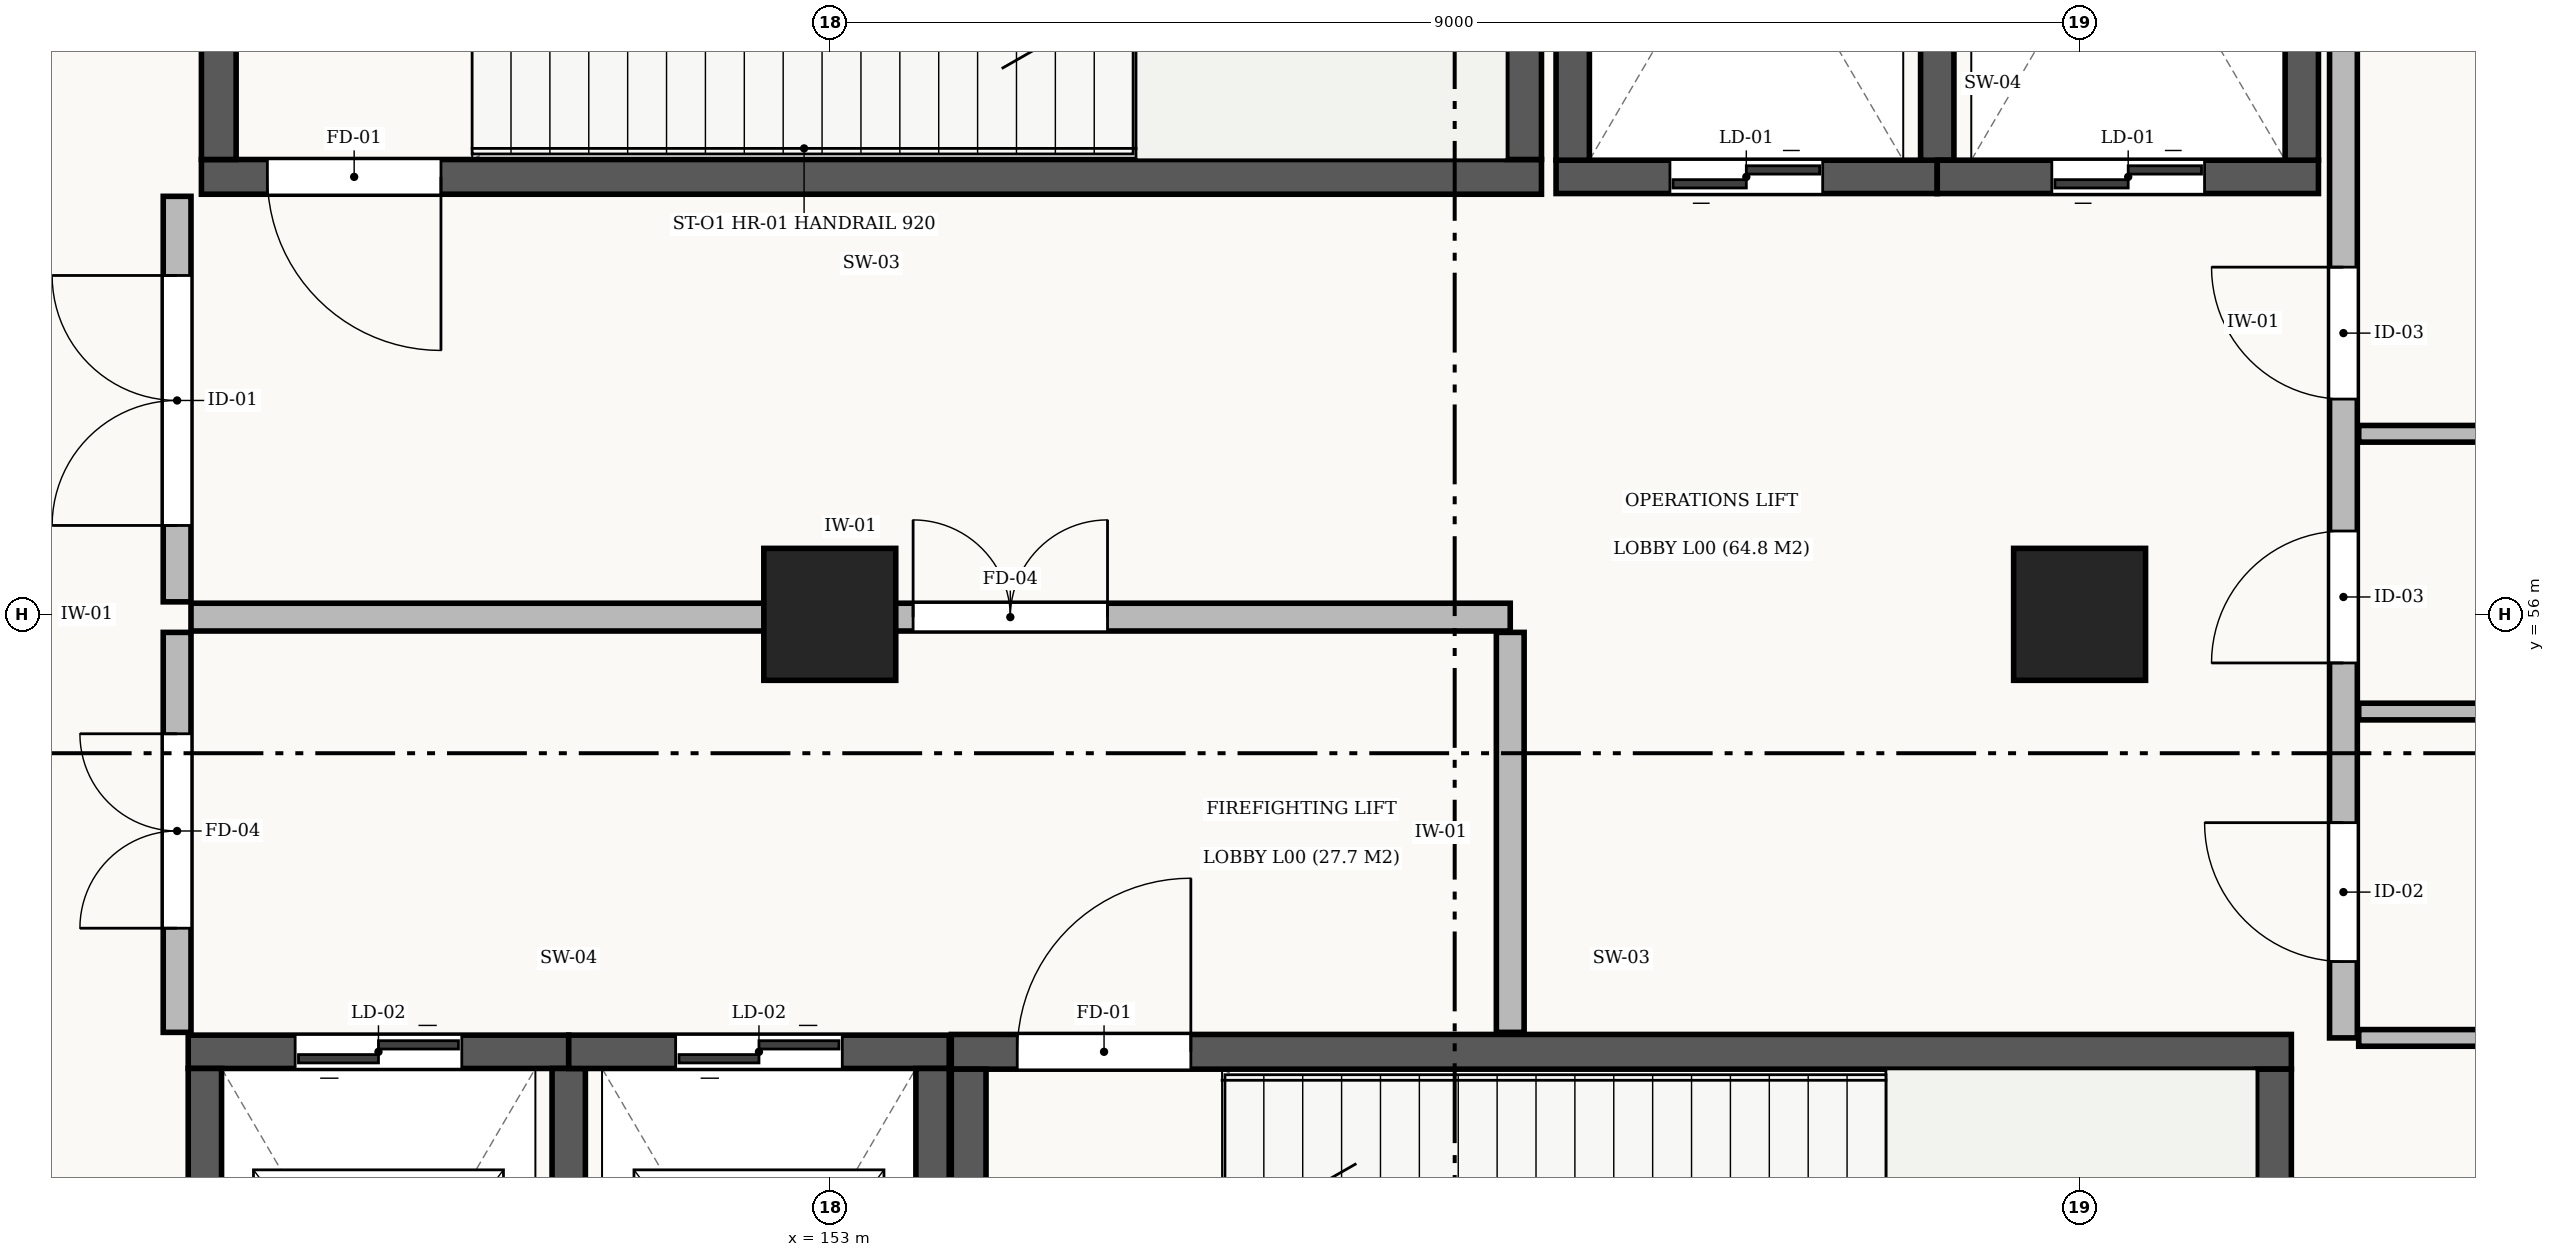
"""IFC4 building model, lengths in metres.
Left out: names, types, materials, properties, quantities, classifications, styles, units other than length and angle.
Written with IfcOpenShell. Run it as: python <this file> out.ifc"""

import sys

from ifc_helpers import new_model, si_unit, direction, frame, frame_2d, origin, origin_2d, place, context, subcontext, project, spatial, rectangle, extrude, element, fill, save


model = new_model("IFC4")
c1 = context("Model", 3, precision=1e-05, world=origin(), true_north=direction((0.0, 1.0)))
c2 = subcontext(c1, "Body", "Model", "MODEL_VIEW")
j1 = project(units=[si_unit("LENGTHUNIT", "METRE"), si_unit("PLANEANGLEUNIT", "RADIAN")], contexts=[c1])
p1 = place(None, origin())
s1 = spatial("IfcSite", under=j1, at=p1, CompositionType="ELEMENT")
p2 = place(p1, origin())
s2 = spatial("IfcBuilding", under=s1, at=p2, CompositionType="ELEMENT")
p3 = place(p2, origin())
s3 = spatial("IfcBuildingStorey", under=s2, at=p3, CompositionType="ELEMENT", Elevation=0.0)
for number, where, z_axis, x_axis in (
    (1, (153.0, 56.0, 0.0), (0.0, 0.0, 1.0), (1.0, 0.0, 0.0)),
    (2, (162.0, 56.0, 0.0), (0.0, 0.0, 1.0), (1.0, 0.0, 0.0)),
):
    element("IfcColumn", number, at=place(p3, frame(where, z_axis=z_axis, x_axis=x_axis)), inside=s3, PredefinedType="COLUMN", context=c2, shape_type="SweptSolid", body=[
        extrude(rectangle(XDim=0.95, YDim=0.95, at=origin_2d()), origin(), (0.0, 0.0, 1.0), 5.4),
    ])
p4 = place(p3, frame((148.475, 59.15, 0.0), z_axis=(0.0, 0.0, 1.0), x_axis=(1.0, 0.0, 0.0)))
e3 = element("IfcWall", 3, at=p4, inside=s3, PredefinedType="SHEAR", context=c2, shape_type="SweptSolid", body=[
    extrude(rectangle(XDim=9.65, YDim=0.25, at=frame_2d((4.825, 0.0))), origin(), (0.0, 0.0, 1.0), 5.05),
])
p5 = place(p4, frame((0.475, 0.0, 0.0)))
e4 = element("IfcOpeningElement", 4, at=p5, cuts=e3, PredefinedType="OPENING", context=c2, shape_type="SweptSolid", body=[
    extrude(rectangle(XDim=1.25, YDim=2.15, at=frame_2d((0.625, 1.075))), frame((0.0, 0.137, 0.0), z_axis=(0.0, -1.0, 0.0), x_axis=(1.0, 0.0, 0.0)), (0.0, 0.0, 1.0), 0.274),
])
for number, where, z_axis, x_axis in (
    (5, (148.6, 63.125, 0.0), (0.0, 0.0, 1.0), (0.0, -1.0, 0.0)),
    (6, (158.0, 59.275, 0.0), (0.0, 0.0, 1.0), (0.0, 1.0, 0.0)),
):
    element("IfcWall", number, at=place(p3, frame(where, z_axis=z_axis, x_axis=x_axis)), inside=s3, PredefinedType="SHEAR", context=c2, shape_type="SweptSolid", body=[
        extrude(rectangle(XDim=3.85, YDim=0.25, at=frame_2d((1.925, 0.0))), origin(), (0.0, 0.0, 1.0), 5.05),
    ])
p6 = place(p3, frame((163.525, 52.85, 0.0), z_axis=(0.0, 0.0, 1.0), x_axis=(-1.0, 0.0, 0.0)))
e7 = element("IfcWall", 7, at=p6, inside=s3, PredefinedType="SHEAR", context=c2, shape_type="SweptSolid", body=[
    extrude(rectangle(XDim=9.65, YDim=0.25, at=frame_2d((4.825, 0.0))), origin(), (0.0, 0.0, 1.0), 5.05),
])
p7 = place(p6, frame((7.925, 0.0, 0.0)))
e8 = element("IfcOpeningElement", 8, at=p7, cuts=e7, PredefinedType="OPENING", context=c2, shape_type="SweptSolid", body=[
    extrude(rectangle(XDim=1.25, YDim=2.15, at=frame_2d((0.625, 1.075))), frame((0.0, 0.137, 0.0), z_axis=(0.0, -1.0, 0.0), x_axis=(1.0, 0.0, 0.0)), (0.0, 0.0, 1.0), 0.274),
])
for number, where, z_axis, x_axis in (
    (9, (154.0, 52.725, 0.0), (0.0, 0.0, 1.0), (0.0, -1.0, 0.0)),
    (10, (163.4, 48.875, 0.0), (0.0, 0.0, 1.0), (0.0, 1.0, 0.0)),
):
    element("IfcWall", number, at=place(p3, frame(where, z_axis=z_axis, x_axis=x_axis)), inside=s3, PredefinedType="SHEAR", context=c2, shape_type="SweptSolid", body=[
        extrude(rectangle(XDim=3.85, YDim=0.25, at=frame_2d((1.925, 0.0))), origin(), (0.0, 0.0, 1.0), 5.05),
    ])
p8 = place(p3, frame((158.23, 59.15, 0.0), z_axis=(0.0, 0.0, 1.0), x_axis=(1.0, 0.0, 0.0)))
e11 = element("IfcWall", 11, at=p8, inside=s3, PredefinedType="SHEAR", context=c2, shape_type="SweptSolid", body=[
    extrude(rectangle(XDim=2.745, YDim=0.24, at=frame_2d((1.373, 0.0))), origin(), (0.0, 0.0, 1.0), 5.05),
])
p9 = place(p8, frame((0.82, 0.0, 0.0)))
e12 = element("IfcOpeningElement", 12, at=p9, cuts=e11, PredefinedType="OPENING", context=c2, shape_type="SweptSolid", body=[
    extrude(rectangle(XDim=1.1, YDim=2.2, at=frame_2d((0.55, 1.1))), frame((0.0, 0.132, 0.0), z_axis=(0.0, -1.0, 0.0), x_axis=(1.0, 0.0, 0.0)), (0.0, 0.0, 1.0), 0.264),
])
for number, where, z_axis, x_axis in (
    (13, (158.35, 63.13, 0.0), (0.0, 0.0, 1.0), (0.0, -1.0, 0.0)),
    (14, (160.975, 59.27, 0.0), (0.0, 0.0, 1.0), (0.0, 1.0, 0.0)),
):
    element("IfcWall", number, at=place(p3, frame(where, z_axis=z_axis, x_axis=x_axis)), inside=s3, PredefinedType="SHEAR", context=c2, shape_type="SweptSolid", body=[
        extrude(rectangle(XDim=3.86, YDim=0.24, at=frame_2d((1.93, 0.0))), origin(), (0.0, 0.0, 1.0), 5.05),
    ])
p10 = place(p3, frame((160.975, 59.15, 0.0), z_axis=(0.0, 0.0, 1.0), x_axis=(1.0, 0.0, 0.0)))
e15 = element("IfcWall", 15, at=p10, inside=s3, PredefinedType="SHEAR", context=c2, shape_type="SweptSolid", body=[
    extrude(rectangle(XDim=2.745, YDim=0.24, at=frame_2d((1.373, 0.0))), origin(), (0.0, 0.0, 1.0), 5.05),
])
p11 = place(p10, frame((0.825, 0.0, 0.0)))
e16 = element("IfcOpeningElement", 16, at=p11, cuts=e15, PredefinedType="OPENING", context=c2, shape_type="SweptSolid", body=[
    extrude(rectangle(XDim=1.1, YDim=2.2, at=frame_2d((0.55, 1.1))), frame((0.0, 0.132, 0.0), z_axis=(0.0, -1.0, 0.0), x_axis=(1.0, 0.0, 0.0)), (0.0, 0.0, 1.0), 0.264),
])
p12 = place(p3, frame((163.6, 59.27, 0.0), z_axis=(0.0, 0.0, 1.0), x_axis=(0.0, 1.0, 0.0)))
e17 = element("IfcWall", 17, at=p12, inside=s3, PredefinedType="SHEAR", context=c2, shape_type="SweptSolid", body=[
    extrude(rectangle(XDim=3.86, YDim=0.24, at=frame_2d((1.93, 0.0))), origin(), (0.0, 0.0, 1.0), 5.05),
])
p13 = place(p3, frame((151.12, 52.85, 0.0), z_axis=(0.0, 0.0, 1.0), x_axis=(-1.0, 0.0, 0.0)))
e18 = element("IfcWall", 18, at=p13, inside=s3, PredefinedType="SHEAR", context=c2, shape_type="SweptSolid", body=[
    extrude(rectangle(XDim=2.74, YDim=0.24, at=frame_2d((1.37, 0.0))), origin(), (0.0, 0.0, 1.0), 5.05),
])
p14 = place(p13, frame((0.77, 0.0, 0.0)))
e19 = element("IfcOpeningElement", 19, at=p14, cuts=e18, PredefinedType="OPENING", context=c2, shape_type="SweptSolid", body=[
    extrude(rectangle(XDim=1.2, YDim=2.2, at=frame_2d((0.6, 1.1))), frame((0.0, 0.132, 0.0), z_axis=(0.0, -1.0, 0.0), x_axis=(1.0, 0.0, 0.0)), (0.0, 0.0, 1.0), 0.264),
])
for number, where, z_axis, x_axis in (
    (20, (148.5, 52.73, 0.0), (0.0, 0.0, 1.0), (0.0, -1.0, 0.0)),
    (21, (151.12, 48.87, 0.0), (0.0, 0.0, 1.0), (0.0, 1.0, 0.0)),
):
    element("IfcWall", number, at=place(p3, frame(where, z_axis=z_axis, x_axis=x_axis)), inside=s3, PredefinedType="SHEAR", context=c2, shape_type="SweptSolid", body=[
        extrude(rectangle(XDim=3.86, YDim=0.24, at=frame_2d((1.93, 0.0))), origin(), (0.0, 0.0, 1.0), 5.05),
    ])
p15 = place(p3, frame((153.86, 52.85, 0.0), z_axis=(0.0, 0.0, 1.0), x_axis=(-1.0, 0.0, 0.0)))
e22 = element("IfcWall", 22, at=p15, inside=s3, PredefinedType="SHEAR", context=c2, shape_type="SweptSolid", body=[
    extrude(rectangle(XDim=2.74, YDim=0.24, at=frame_2d((1.37, 0.0))), origin(), (0.0, 0.0, 1.0), 5.05),
])
p16 = place(p15, frame((0.77, 0.0, 0.0)))
e23 = element("IfcOpeningElement", 23, at=p16, cuts=e22, PredefinedType="OPENING", context=c2, shape_type="SweptSolid", body=[
    extrude(rectangle(XDim=1.2, YDim=2.2, at=frame_2d((0.6, 1.1))), frame((0.0, 0.132, 0.0), z_axis=(0.0, -1.0, 0.0), x_axis=(1.0, 0.0, 0.0)), (0.0, 0.0, 1.0), 0.264),
])
p17 = place(p3, frame((153.74, 48.87, 0.0), z_axis=(0.0, 0.0, 1.0), x_axis=(0.0, 1.0, 0.0)))
e24 = element("IfcWall", 24, at=p17, inside=s3, PredefinedType="SHEAR", context=c2, shape_type="SweptSolid", body=[
    extrude(rectangle(XDim=3.86, YDim=0.24, at=frame_2d((1.93, 0.0))), origin(), (0.0, 0.0, 1.0), 5.05),
])
p18 = place(p3, frame((148.4, 55.98, 0.0), z_axis=(0.0, 0.0, 1.0), x_axis=(1.0, 0.0, 0.0)))
e25 = element("IfcWall", 25, at=p18, inside=s3, PredefinedType="STANDARD", context=c2, shape_type="SweptSolid", body=[
    extrude(rectangle(XDim=9.5, YDim=0.2, at=frame_2d((4.75, 0.0))), origin(), (0.0, 0.0, 1.0), 4.23),
])
p19 = place(p18, frame((5.2, 0.0, 0.0)))
e26 = element("IfcOpeningElement", 26, at=p19, cuts=e25, PredefinedType="OPENING", context=c2, shape_type="SweptSolid", body=[
    extrude(rectangle(XDim=1.4, YDim=2.2, at=frame_2d((0.7, 1.1))), frame((0.0, 0.112, 0.0), z_axis=(0.0, -1.0, 0.0), x_axis=(1.0, 0.0, 0.0)), (0.0, 0.0, 1.0), 0.224),
])
p20 = place(p3, frame((157.9, 52.99, 0.0), z_axis=(0.0, 0.0, 1.0), x_axis=(0.0, 1.0, 0.0)))
e27 = element("IfcWall", 27, at=p20, inside=s3, PredefinedType="STANDARD", context=c2, shape_type="SweptSolid", body=[
    extrude(rectangle(XDim=2.88, YDim=0.2, at=frame_2d((1.44, 0.0))), origin(), (0.0, 0.0, 1.0), 5.05),
])
p21 = place(p3, frame((148.3, 52.99, 0.0), z_axis=(0.0, 0.0, 1.0), x_axis=(0.0, 1.0, 0.0)))
e28 = element("IfcWall", 28, at=p21, inside=s3, PredefinedType="STANDARD", context=c2, shape_type="SweptSolid", body=[
    extrude(rectangle(XDim=2.88, YDim=0.2, at=frame_2d((1.44, 0.0))), origin(), (0.0, 0.0, 1.0), 5.05),
])
p22 = place(p21, frame((0.75, 0.0, 0.0)))
e29 = element("IfcOpeningElement", 29, at=p22, cuts=e28, PredefinedType="OPENING", context=c2, shape_type="SweptSolid", body=[
    extrude(rectangle(XDim=1.4, YDim=2.2, at=frame_2d((0.7, 1.1))), frame((0.0, 0.112, 0.0), z_axis=(0.0, -1.0, 0.0), x_axis=(1.0, 0.0, 0.0)), (0.0, 0.0, 1.0), 0.224),
])
p23 = place(p3, frame((148.3, 56.09, 0.0), z_axis=(0.0, 0.0, 1.0), x_axis=(0.0, 1.0, 0.0)))
e30 = element("IfcWall", 30, at=p23, inside=s3, PredefinedType="STANDARD", context=c2, shape_type="SweptSolid", body=[
    extrude(rectangle(XDim=2.92, YDim=0.2, at=frame_2d((1.46, 0.0))), origin(), (0.0, 0.0, 1.0), 5.05),
])
p24 = place(p23, frame((0.55, 0.0, 0.0)))
e31 = element("IfcOpeningElement", 31, at=p24, cuts=e30, PredefinedType="OPENING", context=c2, shape_type="SweptSolid", body=[
    extrude(rectangle(XDim=1.8, YDim=2.2, at=frame_2d((0.9, 1.1))), frame((0.0, 0.112, 0.0), z_axis=(0.0, -1.0, 0.0), x_axis=(1.0, 0.0, 0.0)), (0.0, 0.0, 1.0), 0.224),
])
p25 = place(p3, frame((163.9, 52.95, 0.0), z_axis=(0.0, 0.0, 1.0), x_axis=(0.0, 1.0, 0.0)))
e32 = element("IfcWall", 32, at=p25, inside=s3, PredefinedType="STANDARD", context=c2, shape_type="SweptSolid", body=[
    extrude(rectangle(XDim=10.3, YDim=0.2, at=frame_2d((5.15, 0.0))), origin(), (0.0, 0.0, 1.0), 5.05),
])
p26 = place(p25, frame((0.55, 0.0, 0.0)))
e33 = element("IfcOpeningElement", 33, at=p26, cuts=e32, PredefinedType="OPENING", context=c2, shape_type="SweptSolid", body=[
    extrude(rectangle(XDim=1.0, YDim=2.1, at=frame_2d((0.5, 1.05))), frame((0.0, 0.112, 0.0), z_axis=(0.0, -1.0, 0.0), x_axis=(1.0, 0.0, 0.0)), (0.0, 0.0, 1.0), 0.224),
])
p27 = place(p25, frame((2.7, 0.0, 0.0)))
e34 = element("IfcOpeningElement", 34, at=p27, cuts=e32, PredefinedType="OPENING", context=c2, shape_type="SweptSolid", body=[
    extrude(rectangle(XDim=0.95, YDim=2.1, at=frame_2d((0.475, 1.05))), frame((0.0, 0.112, 0.0), z_axis=(0.0, -1.0, 0.0), x_axis=(1.0, 0.0, 0.0)), (0.0, 0.0, 1.0), 0.224),
])
p28 = place(p25, frame((4.6, 0.0, 0.0)))
e35 = element("IfcOpeningElement", 35, at=p28, cuts=e32, PredefinedType="OPENING", context=c2, shape_type="SweptSolid", body=[
    extrude(rectangle(XDim=0.95, YDim=2.1, at=frame_2d((0.475, 1.05))), frame((0.0, 0.112, 0.0), z_axis=(0.0, -1.0, 0.0), x_axis=(1.0, 0.0, 0.0)), (0.0, 0.0, 1.0), 0.224),
])
for number, where, z_axis, x_axis in (
    (36, (164.01, 52.95, 0.0), (0.0, 0.0, 1.0), (1.0, 0.0, 0.0)),
    (37, (164.01, 55.3, 0.0), (0.0, 0.0, 1.0), (1.0, 0.0, 0.0)),
    (38, (164.01, 57.3, 0.0), (0.0, 0.0, 1.0), (1.0, 0.0, 0.0)),
):
    element("IfcWall", number, at=place(p3, frame(where, z_axis=z_axis, x_axis=x_axis)), inside=s3, PredefinedType="STANDARD", context=c2, shape_type="SweptSolid", body=[
        extrude(rectangle(XDim=6.765, YDim=0.12, at=frame_2d((3.382, 0.0))), origin(), (0.0, 0.0, 1.0), 5.05),
    ])
p29 = place(p5, frame((1.25, 0.0, 0.0), z_axis=(0.0, 0.0, 1.0), x_axis=(-1.0, 0.0, 0.0)))
e39 = element("IfcDoor", 39, at=p29, inside=s3, OperationType="SINGLE_SWING_LEFT", PredefinedType="DOOR", context=c2, shape_type="SweptSolid", body=[
    extrude(rectangle(XDim=1.25, YDim=2.15, at=frame_2d((0.625, 1.075))), frame((0.0, 0.025, 0.0), z_axis=(0.0, -1.0, 0.0), x_axis=(1.0, 0.0, 0.0)), (0.0, 0.0, 1.0), 0.05),
])
fill(e4, e39)
p30 = place(p7, frame((1.25, 0.0, 0.0), z_axis=(0.0, 0.0, 1.0), x_axis=(-1.0, 0.0, 0.0)))
e40 = element("IfcDoor", 40, at=p30, inside=s3, OperationType="SINGLE_SWING_RIGHT", PredefinedType="DOOR", context=c2, shape_type="SweptSolid", body=[
    extrude(rectangle(XDim=1.25, YDim=2.15, at=frame_2d((0.625, 1.075))), frame((0.0, 0.025, 0.0), z_axis=(0.0, -1.0, 0.0), x_axis=(1.0, 0.0, 0.0)), (0.0, 0.0, 1.0), 0.05),
])
fill(e8, e40)
p31 = place(p9, origin())
e41 = element("IfcDoor", 41, at=p31, inside=s3, OperationType="DOUBLE_DOOR_SLIDING", PredefinedType="DOOR", context=c2, shape_type="SweptSolid", body=[
    extrude(rectangle(XDim=1.1, YDim=2.2, at=frame_2d((0.55, 1.1))), frame((0.0, 0.025, 0.0), z_axis=(0.0, -1.0, 0.0), x_axis=(1.0, 0.0, 0.0)), (0.0, 0.0, 1.0), 0.05),
])
fill(e12, e41)
p32 = place(p11, origin())
e42 = element("IfcDoor", 42, at=p32, inside=s3, OperationType="DOUBLE_DOOR_SLIDING", PredefinedType="DOOR", context=c2, shape_type="SweptSolid", body=[
    extrude(rectangle(XDim=1.1, YDim=2.2, at=frame_2d((0.55, 1.1))), frame((0.0, 0.025, 0.0), z_axis=(0.0, -1.0, 0.0), x_axis=(1.0, 0.0, 0.0)), (0.0, 0.0, 1.0), 0.05),
])
fill(e16, e42)
p33 = place(p14, origin())
e43 = element("IfcDoor", 43, at=p33, inside=s3, OperationType="DOUBLE_DOOR_SLIDING", PredefinedType="DOOR", context=c2, shape_type="SweptSolid", body=[
    extrude(rectangle(XDim=1.2, YDim=2.2, at=frame_2d((0.6, 1.1))), frame((0.0, 0.025, 0.0), z_axis=(0.0, -1.0, 0.0), x_axis=(1.0, 0.0, 0.0)), (0.0, 0.0, 1.0), 0.05),
])
fill(e19, e43)
p34 = place(p16, origin())
e44 = element("IfcDoor", 44, at=p34, inside=s3, OperationType="DOUBLE_DOOR_SLIDING", PredefinedType="DOOR", context=c2, shape_type="SweptSolid", body=[
    extrude(rectangle(XDim=1.2, YDim=2.2, at=frame_2d((0.6, 1.1))), frame((0.0, 0.025, 0.0), z_axis=(0.0, -1.0, 0.0), x_axis=(1.0, 0.0, 0.0)), (0.0, 0.0, 1.0), 0.05),
])
fill(e23, e44)
p35 = place(p19, origin())
e45 = element("IfcDoor", 45, at=p35, inside=s3, OperationType="DOUBLE_DOOR_SINGLE_SWING", PredefinedType="DOOR", context=c2, shape_type="SweptSolid", body=[
    extrude(rectangle(XDim=1.4, YDim=2.2, at=frame_2d((0.7, 1.1))), frame((0.0, 0.025, 0.0), z_axis=(0.0, -1.0, 0.0), x_axis=(1.0, 0.0, 0.0)), (0.0, 0.0, 1.0), 0.05),
])
fill(e26, e45)
p36 = place(p22, origin())
e46 = element("IfcDoor", 46, at=p36, inside=s3, OperationType="DOUBLE_DOOR_SINGLE_SWING", PredefinedType="DOOR", context=c2, shape_type="SweptSolid", body=[
    extrude(rectangle(XDim=1.4, YDim=2.2, at=frame_2d((0.7, 1.1))), frame((0.0, 0.025, 0.0), z_axis=(0.0, -1.0, 0.0), x_axis=(1.0, 0.0, 0.0)), (0.0, 0.0, 1.0), 0.05),
])
fill(e29, e46)
p37 = place(p24, origin())
e47 = element("IfcDoor", 47, at=p37, inside=s3, OperationType="DOUBLE_DOOR_SINGLE_SWING", PredefinedType="DOOR", context=c2, shape_type="SweptSolid", body=[
    extrude(rectangle(XDim=1.8, YDim=2.2, at=frame_2d((0.9, 1.1))), frame((0.0, 0.025, 0.0), z_axis=(0.0, -1.0, 0.0), x_axis=(1.0, 0.0, 0.0)), (0.0, 0.0, 1.0), 0.05),
])
fill(e31, e47)
p38 = place(p26, origin())
e48 = element("IfcDoor", 48, at=p38, inside=s3, OperationType="SINGLE_SWING_RIGHT", PredefinedType="DOOR", context=c2, shape_type="SweptSolid", body=[
    extrude(rectangle(XDim=1.0, YDim=2.1, at=frame_2d((0.5, 1.05))), frame((0.0, 0.025, 0.0), z_axis=(0.0, -1.0, 0.0), x_axis=(1.0, 0.0, 0.0)), (0.0, 0.0, 1.0), 0.05),
])
fill(e33, e48)
p39 = place(p27, origin())
e49 = element("IfcDoor", 49, at=p39, inside=s3, OperationType="SINGLE_SWING_LEFT", PredefinedType="DOOR", context=c2, shape_type="SweptSolid", body=[
    extrude(rectangle(XDim=0.95, YDim=2.1, at=frame_2d((0.475, 1.05))), frame((0.0, 0.025, 0.0), z_axis=(0.0, -1.0, 0.0), x_axis=(1.0, 0.0, 0.0)), (0.0, 0.0, 1.0), 0.05),
])
fill(e34, e49)
p40 = place(p28, origin())
e50 = element("IfcDoor", 50, at=p40, inside=s3, OperationType="SINGLE_SWING_RIGHT", PredefinedType="DOOR", context=c2, shape_type="SweptSolid", body=[
    extrude(rectangle(XDim=0.95, YDim=2.1, at=frame_2d((0.475, 1.05))), frame((0.0, 0.025, 0.0), z_axis=(0.0, -1.0, 0.0), x_axis=(1.0, 0.0, 0.0)), (0.0, 0.0, 1.0), 0.05),
])
fill(e35, e50)
save(model, sys.argv[1])
